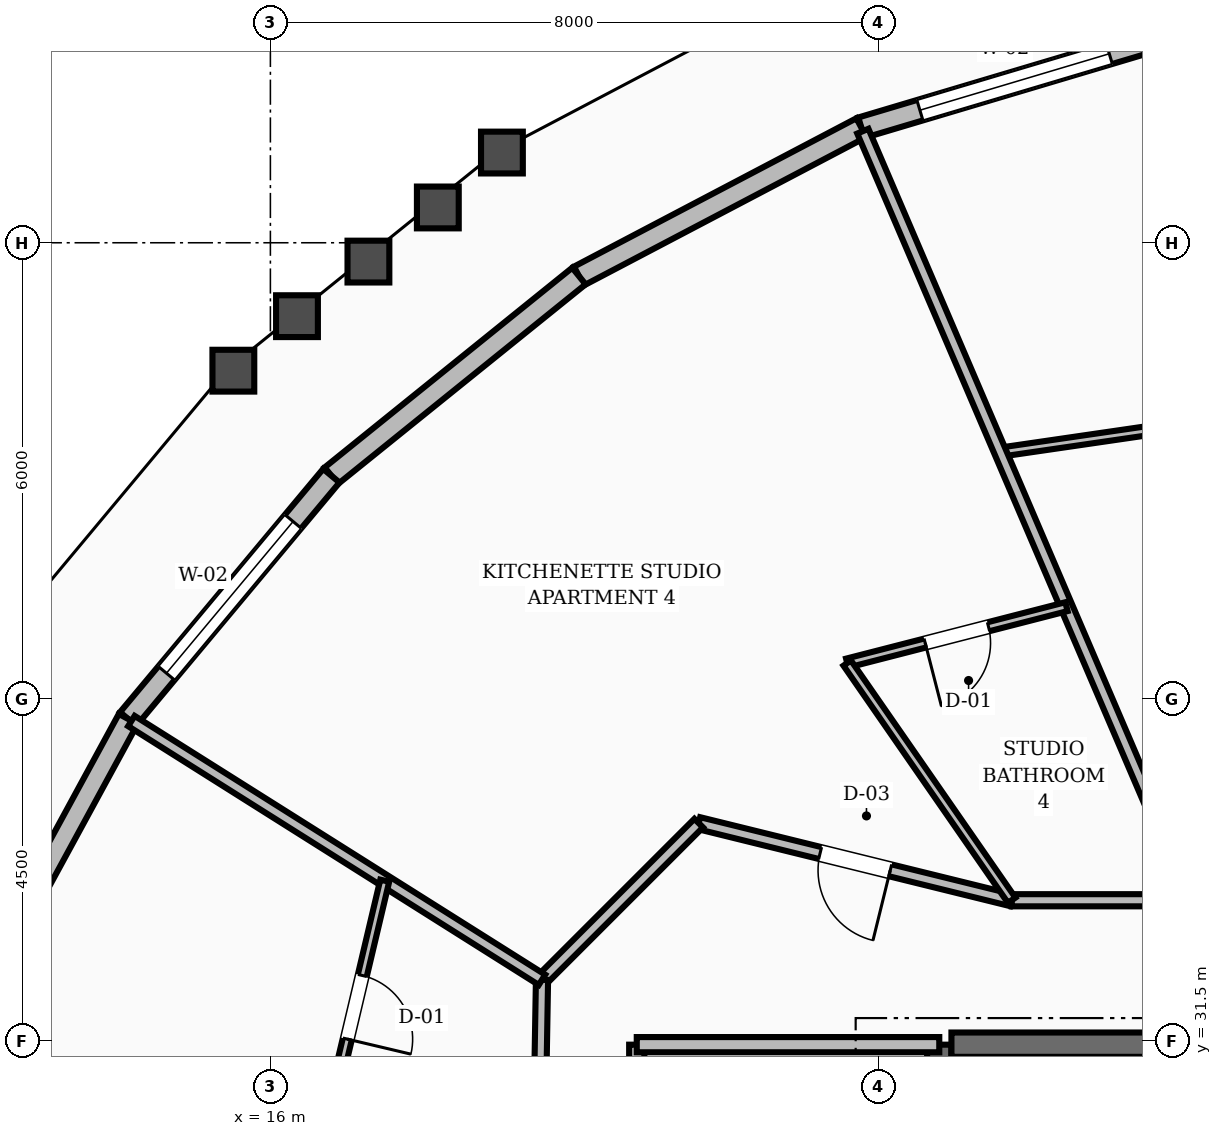
"""IFC4 building model, lengths in metres.
Left out: names, types, materials, properties, quantities, classifications, styles, units other than length and angle.
Written with IfcOpenShell. Run it as: python <this file> out.ifc"""

import sys

from ifc_helpers import new_model, si_unit, direction, frame, frame_2d, origin, place, context, subcontext, project, spatial, rectangle, extrude, element, fill, save


model = new_model("IFC4")
c1 = context("Model", 3, precision=1e-05, world=origin(), true_north=direction((0.0, 1.0)))
c2 = subcontext(c1, "Body", "Model", "MODEL_VIEW")
j1 = project(units=[si_unit("LENGTHUNIT", "METRE"), si_unit("PLANEANGLEUNIT", "RADIAN")], contexts=[c1])
p1 = place(None, origin())
s1 = spatial("IfcSite", under=j1, at=p1, CompositionType="ELEMENT")
p2 = place(p1, origin())
s2 = spatial("IfcBuilding", under=s1, at=p2, CompositionType="ELEMENT")
p3 = place(p2, frame((0.0, 0.0, 243.6)))
s3 = spatial("IfcBuildingStorey", under=s2, at=p3, CompositionType="ELEMENT", Elevation=243.6)
p4 = place(p3, frame((24.8, 25.15, 0.0), z_axis=(0.0, 0.0, 1.0), x_axis=(0.0, 1.0, 0.0)))
e1 = element("IfcWall", 1, at=p4, inside=s3, PredefinedType="SHEAR", context=c2, shape_type="SweptSolid", body=[
    extrude(rectangle(XDim=6.3, YDim=0.32, at=frame_2d((3.15, 0.0))), origin(), (0.0, 0.0, 1.0), 3.6),
])
p5 = place(p3, frame((24.96, 31.45, 0.0), z_axis=(0.0, 0.0, 1.0), x_axis=(1.0, 0.0, 0.0)))
e2 = element("IfcWall", 2, at=p5, inside=s3, PredefinedType="SHEAR", context=c2, shape_type="SweptSolid", body=[
    extrude(rectangle(XDim=3.24, YDim=0.32, at=frame_2d((1.62, 0.0))), origin(), (0.0, 0.0, 1.0), 3.6),
])
p6 = place(p3, frame((27.807, 44.716, 0.0), z_axis=(0.0, 0.0, 1.0), x_axis=(-0.958312014412, -0.285723788009, 0.0)))
e3 = element("IfcWall", 3, at=p6, inside=s3, PredefinedType="STANDARD", context=c2, shape_type="SweptSolid", body=[
    extrude(rectangle(XDim=4.207, YDim=0.28, at=frame_2d((2.104, 0.0))), origin(), (0.0, 0.0, 1.0), 2.88),
])
p7 = place(p6, frame((0.804, 0.0, 0.8)))
e4 = element("IfcOpeningElement", 4, at=p7, cuts=e3, PredefinedType="OPENING", context=c2, shape_type="SweptSolid", body=[
    extrude(rectangle(XDim=2.6, YDim=1.65, at=frame_2d((1.3, 0.825))), frame((0.0, 0.15, 0.0), z_axis=(0.0, -1.0, 0.0), x_axis=(1.0, 0.0, 0.0)), (0.0, 0.0, 1.0), 0.3),
])
p8 = place(p3, frame((23.775, 43.514, 0.0), z_axis=(0.0, 0.0, 1.0), x_axis=(-0.885290153249, -0.46503907853, 0.0)))
e5 = element("IfcWall", 5, at=p8, inside=s3, PredefinedType="STANDARD", context=c2, shape_type="SweptSolid", body=[
    extrude(rectangle(XDim=4.197, YDim=0.28, at=frame_2d((2.099, 0.0))), origin(), (0.0, 0.0, 1.0), 2.88),
])
p9 = place(p3, frame((20.059, 41.562, 0.0), z_axis=(0.0, 0.0, 1.0), x_axis=(-0.778409360575, -0.627757012999, 0.0)))
e6 = element("IfcWall", 6, at=p9, inside=s3, PredefinedType="STANDARD", context=c2, shape_type="SweptSolid", body=[
    extrude(rectangle(XDim=4.184, YDim=0.28, at=frame_2d((2.092, 0.0))), origin(), (0.0, 0.0, 1.0), 2.88),
])
p10 = place(p3, frame((16.802, 38.935, 0.0), z_axis=(0.0, 0.0, 1.0), x_axis=(-0.64097876836, -0.767558609171, 0.0)))
e7 = element("IfcWall", 7, at=p10, inside=s3, PredefinedType="STANDARD", context=c2, shape_type="SweptSolid", body=[
    extrude(rectangle(XDim=4.17, YDim=0.28, at=frame_2d((2.085, 0.0))), origin(), (0.0, 0.0, 1.0), 2.88),
])
p11 = place(p10, frame((0.785, 0.0, 0.8)))
e8 = element("IfcOpeningElement", 8, at=p11, cuts=e7, PredefinedType="OPENING", context=c2, shape_type="SweptSolid", body=[
    extrude(rectangle(XDim=2.6, YDim=1.65, at=frame_2d((1.3, 0.825))), frame((0.0, 0.15, 0.0), z_axis=(0.0, -1.0, 0.0), x_axis=(1.0, 0.0, 0.0)), (0.0, 0.0, 1.0), 0.3),
])
p12 = place(p3, frame((14.129, 35.735, 0.0), z_axis=(0.0, 0.0, 1.0), x_axis=(-0.477839535555, -0.878447140277, 0.0)))
e9 = element("IfcWall", 9, at=p12, inside=s3, PredefinedType="STANDARD", context=c2, shape_type="SweptSolid", body=[
    extrude(rectangle(XDim=4.157, YDim=0.28, at=frame_2d((2.079, 0.0))), origin(), (0.0, 0.0, 1.0), 2.88),
])
p13 = place(p3, frame((20.82, 28.32, 0.0), z_axis=(0.0, 0.0, 1.0), x_axis=(0.0, 1.0, 0.0)))
e10 = element("IfcWall", 10, at=p13, inside=s3, PredefinedType="SOLIDWALL", context=c2, shape_type="SweptSolid", body=[
    extrude(rectangle(XDim=3.13, YDim=0.2, at=frame_2d((1.565, 0.0))), origin(), (0.0, 0.0, 1.0), 2.87),
])
p14 = place(p13, frame((1.09, 0.0, 0.0)))
e11 = element("IfcOpeningElement", 11, at=p14, cuts=e10, PredefinedType="OPENING", context=c2, shape_type="SweptSolid", body=[
    extrude(rectangle(XDim=0.95, YDim=2.1, at=frame_2d((0.475, 1.05))), frame((0.0, 0.11, 0.0), z_axis=(0.0, -1.0, 0.0), x_axis=(1.0, 0.0, 0.0)), (0.0, 0.0, 1.0), 0.22),
])
p15 = place(p3, frame((20.82, 31.45, 0.0), z_axis=(0.0, 0.0, 1.0), x_axis=(1.0, 0.0, 0.0)))
e12 = element("IfcWall", 12, at=p15, inside=s3, PredefinedType="SOLIDWALL", context=c2, shape_type="SweptSolid", body=[
    extrude(rectangle(XDim=3.98, YDim=0.2, at=frame_2d((1.99, 0.0))), origin(), (0.0, 0.0, 1.0), 2.87),
])
p16 = place(p3, frame((28.127, 33.35, 0.0), z_axis=(0.0, 0.0, 1.0), x_axis=(-1.0, 0.0, 0.0)))
e13 = element("IfcWall", 13, at=p16, inside=s3, PredefinedType="SOLIDWALL", context=c2, shape_type="SweptSolid", body=[
    extrude(rectangle(XDim=2.375, YDim=0.16, at=frame_2d((1.188, 0.0))), origin(), (0.0, 0.0, 1.0), 2.87),
])
p17 = place(p3, frame((25.752, 33.35, 0.0), z_axis=(0.0, 0.0, 1.0), x_axis=(-0.970939799552, 0.239323850978, 0.0)))
e14 = element("IfcWall", 14, at=p17, inside=s3, PredefinedType="SOLIDWALL", context=c2, shape_type="SweptSolid", body=[
    extrude(rectangle(XDim=4.241, YDim=0.16, at=frame_2d((2.12, 0.0))), origin(), (0.0, 0.0, 1.0), 2.87),
])
p18 = place(p17, frame((1.646, 0.0, 0.0)))
e15 = element("IfcOpeningElement", 15, at=p18, cuts=e14, PredefinedType="OPENING", context=c2, shape_type="SweptSolid", body=[
    extrude(rectangle(XDim=0.95, YDim=2.1, at=frame_2d((0.475, 1.05))), frame((0.0, 0.09, 0.0), z_axis=(0.0, -1.0, 0.0), x_axis=(1.0, 0.0, 0.0)), (0.0, 0.0, 1.0), 0.18),
])
p19 = place(p3, frame((21.635, 34.365, 0.0), z_axis=(0.0, 0.0, 1.0), x_axis=(-0.707106781187, -0.707106781187, 0.0)))
e16 = element("IfcWall", 16, at=p19, inside=s3, PredefinedType="SOLIDWALL", context=c2, shape_type="SweptSolid", body=[
    extrude(rectangle(XDim=2.916, YDim=0.16, at=frame_2d((1.458, 0.0))), origin(), (0.0, 0.0, 1.0), 2.87),
])
p20 = place(p3, frame((19.573, 32.303, 0.0), z_axis=(0.0, 0.0, 1.0), x_axis=(-0.016981035134, -0.999855811828, 0.0)))
e17 = element("IfcWall", 17, at=p20, inside=s3, PredefinedType="SOLIDWALL", context=c2, shape_type="SweptSolid", body=[
    extrude(rectangle(XDim=3.134, YDim=0.16, at=frame_2d((1.567, 0.0))), origin(), (0.0, 0.0, 1.0), 2.87),
])
p21 = place(p3, frame((32.0, 40.177, 0.0), z_axis=(0.0, 0.0, 1.0), x_axis=(-0.989545223303, -0.144222921337, 0.0)))
e18 = element("IfcWall", 18, at=p21, inside=s3, PredefinedType="PARTITIONING", context=c2, shape_type="SweptSolid", body=[
    extrude(rectangle(XDim=6.465, YDim=0.12, at=frame_2d((3.232, 0.0))), origin(), (0.0, 0.0, 1.0), 2.87),
])
p22 = place(p21, frame((2.757, 0.0, 0.0)))
e19 = element("IfcOpeningElement", 19, at=p22, cuts=e18, PredefinedType="OPENING", context=c2, shape_type="SweptSolid", body=[
    extrude(rectangle(XDim=0.95, YDim=2.1, at=frame_2d((0.475, 1.05))), frame((0.0, 0.07, 0.0), z_axis=(0.0, -1.0, 0.0), x_axis=(1.0, 0.0, 0.0)), (0.0, 0.0, 1.0), 0.14),
])
p23 = place(p3, frame((28.127, 33.35, 0.0), z_axis=(0.0, 0.0, 1.0), x_axis=(-0.393632832197, 0.919267748492, 0.0)))
e20 = element("IfcWall", 20, at=p23, inside=s3, PredefinedType="SOLIDWALL", context=c2, shape_type="SweptSolid", body=[
    extrude(rectangle(XDim=11.007, YDim=0.16, at=frame_2d((5.503, 0.0))), origin(), (0.0, 0.0, 1.0), 2.87),
])
p24 = place(p3, frame((26.473, 37.212, 0.0), z_axis=(0.0, 0.0, 1.0), x_axis=(-0.96849067282, -0.249049827665, 0.0)))
e21 = element("IfcWall", 21, at=p24, inside=s3, PredefinedType="PARTITIONING", context=c2, shape_type="SweptSolid", body=[
    extrude(rectangle(XDim=2.978, YDim=0.12, at=frame_2d((1.489, 0.0))), origin(), (0.0, 0.0, 1.0), 2.87),
])
p25 = place(p24, frame((1.059, 0.0, 0.0)))
e22 = element("IfcOpeningElement", 22, at=p25, cuts=e21, PredefinedType="OPENING", context=c2, shape_type="SweptSolid", body=[
    extrude(rectangle(XDim=0.86, YDim=2.1, at=frame_2d((0.43, 1.05))), frame((0.0, 0.07, 0.0), z_axis=(0.0, -1.0, 0.0), x_axis=(1.0, 0.0, 0.0)), (0.0, 0.0, 1.0), 0.14),
])
p26 = place(p3, frame((25.752, 33.35, 0.0), z_axis=(0.0, 0.0, 1.0), x_axis=(-0.569728092648, 0.821833255866, 0.0)))
e23 = element("IfcWall", 23, at=p26, inside=s3, PredefinedType="PARTITIONING", context=c2, shape_type="SweptSolid", body=[
    extrude(rectangle(XDim=3.797, YDim=0.12, at=frame_2d((1.898, 0.0))), origin(), (0.0, 0.0, 1.0), 2.87),
])
p27 = place(p3, frame((19.573, 32.303, 0.0), z_axis=(0.0, 0.0, 1.0), x_axis=(-0.845977345185, 0.533218840096, 0.0)))
e24 = element("IfcWall", 24, at=p27, inside=s3, PredefinedType="SOLIDWALL", context=c2, shape_type="SweptSolid", body=[
    extrude(rectangle(XDim=6.385, YDim=0.16, at=frame_2d((3.193, 0.0))), origin(), (0.0, 0.0, 1.0), 2.87),
])
p28 = place(p3, frame((17.504, 33.607, 0.0), z_axis=(0.0, 0.0, 1.0), x_axis=(-0.230128636875, -0.973160218304, 0.0)))
e25 = element("IfcWall", 25, at=p28, inside=s3, PredefinedType="PARTITIONING", context=c2, shape_type="SweptSolid", body=[
    extrude(rectangle(XDim=3.422, YDim=0.12, at=frame_2d((1.711, 0.0))), origin(), (0.0, 0.0, 1.0), 2.87),
])
p29 = place(p28, frame((1.281, 0.0, 0.0)))
e26 = element("IfcOpeningElement", 26, at=p29, cuts=e25, PredefinedType="OPENING", context=c2, shape_type="SweptSolid", body=[
    extrude(rectangle(XDim=0.86, YDim=2.1, at=frame_2d((0.43, 1.05))), frame((0.0, 0.07, 0.0), z_axis=(0.0, -1.0, 0.0), x_axis=(1.0, 0.0, 0.0)), (0.0, 0.0, 1.0), 0.14),
])
p30 = place(p7, origin())
e27 = element("IfcWindow", 27, at=p30, inside=s3, PartitioningType="SINGLE_PANEL", PredefinedType="WINDOW", context=c2, shape_type="SweptSolid", body=[
    extrude(rectangle(XDim=2.6, YDim=1.65, at=frame_2d((1.3, 0.825))), frame((0.0, 0.03, 0.0), z_axis=(0.0, -1.0, 0.0), x_axis=(1.0, 0.0, 0.0)), (0.0, 0.0, 1.0), 0.06),
])
fill(e4, e27)
p31 = place(p11, origin())
e28 = element("IfcWindow", 28, at=p31, inside=s3, PartitioningType="SINGLE_PANEL", PredefinedType="WINDOW", context=c2, shape_type="SweptSolid", body=[
    extrude(rectangle(XDim=2.6, YDim=1.65, at=frame_2d((1.3, 0.825))), frame((0.0, 0.03, 0.0), z_axis=(0.0, -1.0, 0.0), x_axis=(1.0, 0.0, 0.0)), (0.0, 0.0, 1.0), 0.06),
])
fill(e8, e28)
p32 = place(p25, origin())
e29 = element("IfcDoor", 29, at=p32, inside=s3, OperationType="SINGLE_SWING_RIGHT", PredefinedType="DOOR", context=c2, shape_type="SweptSolid", body=[
    extrude(rectangle(XDim=0.86, YDim=2.1, at=frame_2d((0.43, 1.05))), frame((0.0, 0.025, 0.0), z_axis=(0.0, -1.0, 0.0), x_axis=(1.0, 0.0, 0.0)), (0.0, 0.0, 1.0), 0.05),
])
fill(e22, e29)
p33 = place(p18, origin())
e30 = element("IfcDoor", 30, at=p33, inside=s3, OperationType="SINGLE_SWING_LEFT", PredefinedType="DOOR", context=c2, shape_type="SweptSolid", body=[
    extrude(rectangle(XDim=0.95, YDim=2.1, at=frame_2d((0.475, 1.05))), frame((0.0, 0.025, 0.0), z_axis=(0.0, -1.0, 0.0), x_axis=(1.0, 0.0, 0.0)), (0.0, 0.0, 1.0), 0.05),
])
fill(e15, e30)
p34 = place(p29, origin())
e31 = element("IfcDoor", 31, at=p34, inside=s3, OperationType="SINGLE_SWING_RIGHT", PredefinedType="DOOR", context=c2, shape_type="SweptSolid", body=[
    extrude(rectangle(XDim=0.86, YDim=2.1, at=frame_2d((0.43, 1.05))), frame((0.0, 0.025, 0.0), z_axis=(0.0, -1.0, 0.0), x_axis=(1.0, 0.0, 0.0)), (0.0, 0.0, 1.0), 0.05),
])
fill(e26, e31)
save(model, sys.argv[1])
